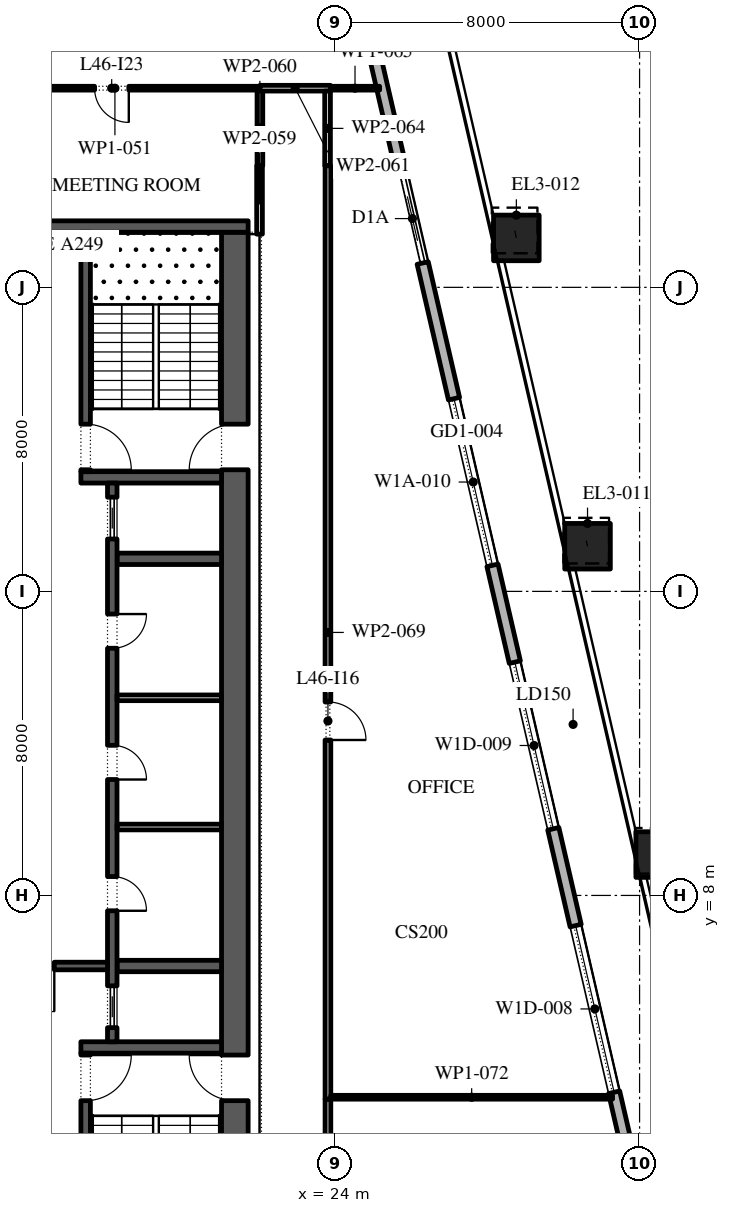
"""IFC4 building model, lengths in metres.
Left out: names, types, materials, properties, quantities, classifications, styles, units other than length and angle.
Written with IfcOpenShell. Run it as: python <this file> out.ifc"""

import sys

from ifc_helpers import new_model, si_unit, direction, frame, frame_2d, origin, origin_2d, place, context, subcontext, project, spatial, rectangle, extrude, element, fill, save


model = new_model("IFC4")
c1 = context("Model", 3, precision=1e-05, world=origin(), true_north=direction((0.0, 1.0)))
c2 = subcontext(c1, "Body", "Model", "MODEL_VIEW")
j1 = project(units=[si_unit("LENGTHUNIT", "METRE"), si_unit("PLANEANGLEUNIT", "RADIAN")], contexts=[c1])
p1 = place(None, origin())
s1 = spatial("IfcSite", under=j1, at=p1, CompositionType="ELEMENT")
p2 = place(p1, origin())
s2 = spatial("IfcBuilding", under=s1, at=p2, CompositionType="ELEMENT")
p3 = place(p2, frame((0.0, 0.0, 209.4)))
s3 = spatial("IfcBuildingStorey", under=s2, at=p3, CompositionType="ELEMENT", Elevation=209.4)
p4 = place(p3, frame((32.503, 9.075, 0.0), z_axis=(-0.00540415818, 0.023418018779, 0.999711154019), x_axis=(-0.974391195695, -0.224859506699, 0.0)))
e1 = element("IfcColumn", 1, at=p4, inside=s3, PredefinedType="COLUMN", context=c2, shape_type="SweptSolid", body=[
    extrude(rectangle(XDim=1.2, YDim=1.2, at=origin_2d()), origin(), (0.0, 0.0, 1.0), 4.201),
])
p5 = place(p3, frame((30.631, 17.188, 0.0), z_axis=(-0.008132379523, 0.035027320373, 0.999353266483), x_axis=(-0.974090845759, -0.226157078617, 0.0)))
e2 = element("IfcColumn", 2, at=p5, inside=s3, PredefinedType="COLUMN", context=c2, shape_type="SweptSolid", body=[
    extrude(rectangle(XDim=1.2, YDim=1.2, at=origin_2d()), origin(), (0.0, 0.0, 1.0), 4.203),
])
p6 = place(p3, frame((28.758, 25.3, 0.0), z_axis=(-0.01079899337, 0.046737578833, 0.998848827635), x_axis=(-0.974329962248, -0.225124686929, 0.0)))
e3 = element("IfcColumn", 3, at=p6, inside=s3, PredefinedType="COLUMN", context=c2, shape_type="SweptSolid", body=[
    extrude(rectangle(XDim=1.2, YDim=1.2, at=origin_2d()), origin(), (0.0, 0.0, 1.0), 4.205),
])
p7 = place(p3, frame((33.157, -5.092, 0.0), z_axis=(0.0, 0.0, 1.0), x_axis=(-0.224950279389, 0.974370243697, 0.0)))
e4 = element("IfcWall", 4, at=p7, inside=s3, PredefinedType="STANDARD", context=c2, shape_type="SweptSolid", body=[
    extrude(rectangle(XDim=49.5, YDim=0.3, at=frame_2d((24.75, 0.0))), origin(), (0.0, 0.0, 1.0), 4.0),
])
p8 = place(p7, frame((2.207, 0.0, 0.0)))
e5 = element("IfcOpeningElement", 5, at=p8, cuts=e4, PredefinedType="OPENING", context=c2, shape_type="SweptSolid", body=[
    extrude(rectangle(XDim=2.4, YDim=3.125, at=frame_2d((1.2, 1.562))), frame((0.0, 0.16, 0.0), z_axis=(0.0, -1.0, 0.0), x_axis=(1.0, 0.0, 0.0)), (0.0, 0.0, 1.0), 0.32),
])
p9 = place(p7, frame((8.121, 0.0, 0.45)))
e6 = element("IfcOpeningElement", 6, at=p9, cuts=e4, PredefinedType="OPENING", context=c2, shape_type="SweptSolid", body=[
    extrude(rectangle(XDim=4.5, YDim=2.875, at=frame_2d((2.25, 1.438))), frame((0.0, 0.16, 0.0), z_axis=(0.0, -1.0, 0.0), x_axis=(1.0, 0.0, 0.0)), (0.0, 0.0, 1.0), 0.32),
])
p10 = place(p7, frame((15.236, 0.0, 0.45)))
e7 = element("IfcOpeningElement", 7, at=p10, cuts=e4, PredefinedType="OPENING", context=c2, shape_type="SweptSolid", body=[
    extrude(rectangle(XDim=4.5, YDim=2.875, at=frame_2d((2.25, 1.438))), frame((0.0, 0.16, 0.0), z_axis=(0.0, -1.0, 0.0), x_axis=(1.0, 0.0, 0.0)), (0.0, 0.0, 1.0), 0.32),
])
p11 = place(p7, frame((22.35, 0.0, 0.45)))
e8 = element("IfcOpeningElement", 8, at=p11, cuts=e4, PredefinedType="OPENING", context=c2, shape_type="SweptSolid", body=[
    extrude(rectangle(XDim=4.5, YDim=3.0, at=frame_2d((2.25, 1.5))), frame((0.0, 0.16, 0.0), z_axis=(0.0, -1.0, 0.0), x_axis=(1.0, 0.0, 0.0)), (0.0, 0.0, 1.0), 0.32),
])
p12 = place(p7, frame((30.514, 0.0, 0.0)))
e9 = element("IfcOpeningElement", 9, at=p12, cuts=e4, PredefinedType="OPENING", context=c2, shape_type="SweptSolid", body=[
    extrude(rectangle(XDim=2.4, YDim=3.45, at=frame_2d((1.2, 1.725))), frame((0.0, 0.16, 0.0), z_axis=(0.0, -1.0, 0.0), x_axis=(1.0, 0.0, 0.0)), (0.0, 0.0, 1.0), 0.32),
])
p13 = place(p7, frame((36.579, 0.0, 0.45)))
e10 = element("IfcOpeningElement", 10, at=p13, cuts=e4, PredefinedType="OPENING", context=c2, shape_type="SweptSolid", body=[
    extrude(rectangle(XDim=4.5, YDim=3.05, at=frame_2d((2.25, 1.525))), frame((0.0, 0.16, 0.0), z_axis=(0.0, -1.0, 0.0), x_axis=(1.0, 0.0, 0.0)), (0.0, 0.0, 1.0), 0.32),
])
p14 = place(p7, frame((43.693, 0.0, 0.45)))
e11 = element("IfcOpeningElement", 11, at=p14, cuts=e4, PredefinedType="OPENING", context=c2, shape_type="SweptSolid", body=[
    extrude(rectangle(XDim=4.5, YDim=3.05, at=frame_2d((2.25, 1.525))), frame((0.0, 0.16, 0.0), z_axis=(0.0, -1.0, 0.0), x_axis=(1.0, 0.0, 0.0)), (0.0, 0.0, 1.0), 0.32),
])
p15 = place(p3, frame((21.35, -2.45, 0.0), z_axis=(0.0, 0.0, 1.0), x_axis=(0.0, 1.0, 0.0)))
e12 = element("IfcWall", 12, at=p15, inside=s3, PredefinedType="SHEAR", context=c2, shape_type="SweptSolid", body=[
    extrude(rectangle(XDim=27.9, YDim=0.7, at=frame_2d((13.95, 0.0))), origin(), (0.0, 0.0, 1.0), 4.0),
])
p16 = place(p15, frame((5.05, 0.0, 0.0)))
e13 = element("IfcOpeningElement", 13, at=p16, cuts=e12, PredefinedType="OPENING", context=c2, shape_type="SweptSolid", body=[
    extrude(rectangle(XDim=1.2, YDim=2.1, at=frame_2d((0.6, 1.05))), frame((0.0, 0.36, 0.0), z_axis=(0.0, -1.0, 0.0), x_axis=(1.0, 0.0, 0.0)), (0.0, 0.0, 1.0), 0.72),
])
p17 = place(p15, frame((21.65, 0.0, 0.0)))
e14 = element("IfcOpeningElement", 14, at=p17, cuts=e12, PredefinedType="OPENING", context=c2, shape_type="SweptSolid", body=[
    extrude(rectangle(XDim=1.2, YDim=2.1, at=frame_2d((0.6, 1.05))), frame((0.0, 0.36, 0.0), z_axis=(0.0, -1.0, 0.0), x_axis=(1.0, 0.0, 0.0)), (0.0, 0.0, 1.0), 0.72),
])
p18 = place(p3, frame((10.3, 25.6, 0.0), z_axis=(0.0, 0.0, 1.0), x_axis=(1.0, 0.0, 0.0)))
e15 = element("IfcWall", 15, at=p18, inside=s3, PredefinedType="SHEAR", context=c2, shape_type="SweptSolid", body=[
    extrude(rectangle(XDim=11.4, YDim=0.3, at=frame_2d((5.7, 0.0))), origin(), (0.0, 0.0, 1.0), 4.0),
])
p19 = place(p3, frame((17.3, 4.0, 0.0), z_axis=(0.0, 0.0, 1.0), x_axis=(1.0, 0.0, 0.0)))
e16 = element("IfcWall", 16, at=p19, inside=s3, PredefinedType="SHEAR", context=c2, shape_type="SweptSolid", body=[
    extrude(rectangle(XDim=3.7, YDim=0.3, at=frame_2d((1.85, 0.0))), origin(), (0.0, 0.0, 1.0), 4.0),
])
p20 = place(p3, frame((17.425, -2.45, 0.0), z_axis=(0.0, 0.0, 1.0), x_axis=(0.0, 1.0, 0.0)))
e17 = element("IfcWall", 17, at=p20, inside=s3, PredefinedType="SHEAR", context=c2, shape_type="SweptSolid", body=[
    extrude(rectangle(XDim=6.3, YDim=0.25, at=frame_2d((3.15, 0.0))), origin(), (0.0, 0.0, 1.0), 4.0),
])
p21 = place(p20, frame((5.05, 0.0, 0.0)))
e18 = element("IfcOpeningElement", 18, at=p21, cuts=e17, PredefinedType="OPENING", context=c2, shape_type="SweptSolid", body=[
    extrude(rectangle(XDim=1.2, YDim=2.1, at=frame_2d((0.6, 1.05))), frame((0.0, 0.135, 0.0), z_axis=(0.0, -1.0, 0.0), x_axis=(1.0, 0.0, 0.0)), (0.0, 0.0, 1.0), 0.27),
])
p22 = place(p3, frame((17.3, 19.0, 0.0), z_axis=(0.0, 0.0, 1.0), x_axis=(1.0, 0.0, 0.0)))
e19 = element("IfcWall", 19, at=p22, inside=s3, PredefinedType="SHEAR", context=c2, shape_type="SweptSolid", body=[
    extrude(rectangle(XDim=3.7, YDim=0.3, at=frame_2d((1.85, 0.0))), origin(), (0.0, 0.0, 1.0), 4.0),
])
p23 = place(p3, frame((17.425, 19.15, 0.0), z_axis=(0.0, 0.0, 1.0), x_axis=(0.0, 1.0, 0.0)))
e20 = element("IfcWall", 20, at=p23, inside=s3, PredefinedType="SHEAR", context=c2, shape_type="SweptSolid", body=[
    extrude(rectangle(XDim=6.3, YDim=0.25, at=frame_2d((3.15, 0.0))), origin(), (0.0, 0.0, 1.0), 4.0),
])
p24 = place(p23, frame((0.05, 0.0, 0.0)))
e21 = element("IfcOpeningElement", 21, at=p24, cuts=e20, PredefinedType="OPENING", context=c2, shape_type="SweptSolid", body=[
    extrude(rectangle(XDim=1.2, YDim=2.1, at=frame_2d((0.6, 1.05))), frame((0.0, 0.135, 0.0), z_axis=(0.0, -1.0, 0.0), x_axis=(1.0, 0.0, 0.0)), (0.0, 0.0, 1.0), 0.27),
])
for number, where, z_axis, x_axis in (
    (22, (18.25, 6.143, 0.0), (0.0, 0.0, 1.0), (1.0, 0.0, 0.0)),
    (23, (18.25, 16.857, 0.0), (0.0, 0.0, 1.0), (1.0, 0.0, 0.0)),
):
    element("IfcWall", number, at=place(p3, frame(where, z_axis=z_axis, x_axis=x_axis)), inside=s3, PredefinedType="SHEAR", context=c2, shape_type="SweptSolid", body=[
        extrude(rectangle(XDim=2.75, YDim=0.3, at=frame_2d((1.375, 0.0))), origin(), (0.0, 0.0, 1.0), 4.0),
    ])
p25 = place(p3, frame((18.125, 4.15, 0.0), z_axis=(0.0, 0.0, 1.0), x_axis=(0.0, 1.0, 0.0)))
e24 = element("IfcWall", 24, at=p25, inside=s3, PredefinedType="SHEAR", context=c2, shape_type="SweptSolid", body=[
    extrude(rectangle(XDim=14.7, YDim=0.25, at=frame_2d((7.35, 0.0))), origin(), (0.0, 0.0, 1.0), 4.0),
])
p26 = place(p25, frame((3.446, 0.0, 0.0)))
e25 = element("IfcOpeningElement", 25, at=p26, cuts=e24, PredefinedType="OPENING", context=c2, shape_type="SweptSolid", body=[
    extrude(rectangle(XDim=0.9, YDim=2.1, at=frame_2d((0.45, 1.05))), frame((0.0, 0.135, 0.0), z_axis=(0.0, -1.0, 0.0), x_axis=(1.0, 0.0, 0.0)), (0.0, 0.0, 1.0), 0.27),
])
p27 = place(p25, frame((6.9, 0.0, 0.0)))
e26 = element("IfcOpeningElement", 26, at=p27, cuts=e24, PredefinedType="OPENING", context=c2, shape_type="SweptSolid", body=[
    extrude(rectangle(XDim=0.9, YDim=2.1, at=frame_2d((0.45, 1.05))), frame((0.0, 0.135, 0.0), z_axis=(0.0, -1.0, 0.0), x_axis=(1.0, 0.0, 0.0)), (0.0, 0.0, 1.0), 0.27),
])
p28 = place(p25, frame((10.354, 0.0, 0.0)))
e27 = element("IfcOpeningElement", 27, at=p28, cuts=e24, PredefinedType="OPENING", context=c2, shape_type="SweptSolid", body=[
    extrude(rectangle(XDim=0.9, YDim=2.1, at=frame_2d((0.45, 1.05))), frame((0.0, 0.135, 0.0), z_axis=(0.0, -1.0, 0.0), x_axis=(1.0, 0.0, 0.0)), (0.0, 0.0, 1.0), 0.27),
])
p29 = place(p25, frame((0.371, 0.0, 0.0)))
e28 = element("IfcOpeningElement", 28, at=p29, cuts=e24, PredefinedType="OPENING", context=c2, shape_type="SweptSolid", body=[
    extrude(rectangle(XDim=1.1, YDim=2.1, at=frame_2d((0.55, 1.05))), frame((0.0, 0.135, 0.0), z_axis=(0.0, -1.0, 0.0), x_axis=(1.0, 0.0, 0.0)), (0.0, 0.0, 1.0), 0.27),
])
p30 = place(p25, frame((13.229, 0.0, 0.0)))
e29 = element("IfcOpeningElement", 29, at=p30, cuts=e24, PredefinedType="OPENING", context=c2, shape_type="SweptSolid", body=[
    extrude(rectangle(XDim=1.1, YDim=2.1, at=frame_2d((0.55, 1.05))), frame((0.0, 0.135, 0.0), z_axis=(0.0, -1.0, 0.0), x_axis=(1.0, 0.0, 0.0)), (0.0, 0.0, 1.0), 0.27),
])
for number, where, z_axis, x_axis in (
    (30, (18.25, 9.8, 0.0), (0.0, 0.0, 1.0), (1.0, 0.0, 0.0)),
    (31, (18.25, 13.2, 0.0), (0.0, 0.0, 1.0), (1.0, 0.0, 0.0)),
):
    element("IfcWall", number, at=place(p3, frame(where, z_axis=z_axis, x_axis=x_axis)), inside=s3, PredefinedType="PARTITIONING", context=c2, shape_type="SweptSolid", body=[
        extrude(rectangle(XDim=2.75, YDim=0.15, at=frame_2d((1.375, 0.0))), origin(), (0.0, 0.0, 1.0), 4.0),
    ])
p31 = place(p3, frame((14.0, 6.143, 0.0), z_axis=(0.0, 0.0, 1.0), x_axis=(1.0, 0.0, 0.0)))
e32 = element("IfcWall", 32, at=p31, inside=s3, PredefinedType="SHEAR", context=c2, shape_type="SweptSolid", body=[
    extrude(rectangle(XDim=4.0, YDim=0.2, at=frame_2d((2.0, 0.0))), origin(), (0.0, 0.0, 1.0), 4.0),
])
p32 = place(p31, frame((1.4, 0.0, 0.0)))
e33 = element("IfcOpeningElement", 33, at=p32, cuts=e32, PredefinedType="OPENING", context=c2, shape_type="SweptSolid", body=[
    extrude(rectangle(XDim=1.2, YDim=2.1, at=frame_2d((0.6, 1.05))), frame((0.0, 0.11, 0.0), z_axis=(0.0, -1.0, 0.0), x_axis=(1.0, 0.0, 0.0)), (0.0, 0.0, 1.0), 0.22),
])
p33 = place(p3, frame((14.38, 29.24, 0.0), z_axis=(0.0, 0.0, 1.0), x_axis=(1.0, 0.0, 0.0)))
e34 = element("IfcWall", 34, at=p33, inside=s3, PredefinedType="PARTITIONING", context=c2, shape_type="SweptSolid", body=[
    extrude(rectangle(XDim=7.63, YDim=0.1, at=frame_2d((3.815, 0.0))), origin(), (0.0, 0.0, 1.0), 4.0),
])
p34 = place(p33, frame((3.28, 0.0, 0.0)))
e35 = element("IfcOpeningElement", 35, at=p34, cuts=e34, PredefinedType="OPENING", context=c2, shape_type="SweptSolid", body=[
    extrude(rectangle(XDim=0.9, YDim=2.1, at=frame_2d((0.45, 1.05))), frame((0.0, 0.06, 0.0), z_axis=(0.0, -1.0, 0.0), x_axis=(1.0, 0.0, 0.0)), (0.0, 0.0, 1.0), 0.12),
])
p35 = place(p3, frame((22.0, 25.4, 0.0), z_axis=(0.0, 0.0, 1.0), x_axis=(0.0, 1.0, 0.0)))
e36 = element("IfcWall", 36, at=p35, inside=s3, PredefinedType="PARTITIONING", context=c2, shape_type="SweptSolid", body=[
    extrude(rectangle(XDim=1.8, YDim=0.15, at=frame_2d((0.9, 0.0))), origin(), (0.0, 0.0, 1.0), 4.0),
])
p36 = place(p3, frame((22.01, 27.2, 0.0), z_axis=(0.0, 0.0, 1.0), x_axis=(0.0, 1.0, 0.0)))
e37 = element("IfcWall", 37, at=p36, inside=s3, PredefinedType="PARTITIONING", context=c2, shape_type="SweptSolid", body=[
    extrude(rectangle(XDim=1.99, YDim=0.15, at=frame_2d((0.995, 0.0))), origin(), (0.0, 0.0, 1.0), 4.0),
])
p37 = place(p3, frame((22.01, 29.24, 0.0), z_axis=(0.0, 0.0, 1.0), x_axis=(1.0, 0.0, 0.0)))
e38 = element("IfcWall", 38, at=p37, inside=s3, PredefinedType="PARTITIONING", context=c2, shape_type="SweptSolid", body=[
    extrude(rectangle(XDim=1.855, YDim=0.15, at=frame_2d((0.927, 0.0))), origin(), (0.0, 0.0, 1.0), 4.0),
])
p38 = place(p3, frame((23.79, 29.165, 0.0), z_axis=(0.0, 0.0, 1.0), x_axis=(0.0, -1.0, 0.0)))
e39 = element("IfcWall", 39, at=p38, inside=s3, PredefinedType="PARTITIONING", context=c2, shape_type="SweptSolid", body=[
    extrude(rectangle(XDim=1.965, YDim=0.15, at=frame_2d((0.982, 0.0))), origin(), (0.0, 0.0, 1.0), 4.0),
])
p39 = place(p3, frame((23.865, 29.24, 0.0), z_axis=(0.0, 0.0, 1.0), x_axis=(1.0, 0.0, 0.0)))
e40 = element("IfcWall", 40, at=p39, inside=s3, PredefinedType="PARTITIONING", context=c2, shape_type="SweptSolid", body=[
    extrude(rectangle(XDim=1.295, YDim=0.1, at=frame_2d((0.647, 0.0))), origin(), (0.0, 0.0, 1.0), 4.0),
])
p40 = place(p3, frame((23.8, 2.64, 0.0), z_axis=(0.0, 0.0, 1.0), x_axis=(0.0, -1.0, 0.0)))
e41 = element("IfcWall", 41, at=p40, inside=s3, PredefinedType="PARTITIONING", context=c2, shape_type="SweptSolid", body=[
    extrude(rectangle(XDim=6.93, YDim=0.15, at=frame_2d((3.465, 0.0))), origin(), (0.0, 0.0, 1.0), 4.0),
])
p41 = place(p40, frame((2.98, 0.0, 0.0)))
e42 = element("IfcOpeningElement", 42, at=p41, cuts=e41, PredefinedType="OPENING", context=c2, shape_type="SweptSolid", body=[
    extrude(rectangle(XDim=1.0, YDim=2.1, at=frame_2d((0.5, 1.05))), frame((0.0, 0.085, 0.0), z_axis=(0.0, -1.0, 0.0), x_axis=(1.0, 0.0, 0.0)), (0.0, 0.0, 1.0), 0.17),
])
p42 = place(p3, frame((23.8, 27.2, 0.0), z_axis=(0.0, 0.0, 1.0), x_axis=(0.0, -1.0, 0.0)))
e43 = element("IfcWall", 43, at=p42, inside=s3, PredefinedType="PARTITIONING", context=c2, shape_type="SweptSolid", body=[
    extrude(rectangle(XDim=24.56, YDim=0.15, at=frame_2d((12.28, 0.0))), origin(), (0.0, 0.0, 1.0), 4.0),
])
p43 = place(p42, frame((14.11, 0.0, 0.0)))
e44 = element("IfcOpeningElement", 44, at=p43, cuts=e43, PredefinedType="OPENING", context=c2, shape_type="SweptSolid", body=[
    extrude(rectangle(XDim=1.0, YDim=2.1, at=frame_2d((0.5, 1.05))), frame((0.0, 0.085, 0.0), z_axis=(0.0, -1.0, 0.0), x_axis=(1.0, 0.0, 0.0)), (0.0, 0.0, 1.0), 0.17),
])
p44 = place(p3, frame((31.289, 2.69, 0.0), z_axis=(0.0, 0.0, 1.0), x_axis=(-1.0, 0.0, 0.0)))
e45 = element("IfcWall", 45, at=p44, inside=s3, PredefinedType="PARTITIONING", context=c2, shape_type="SweptSolid", body=[
    extrude(rectangle(XDim=7.414, YDim=0.1, at=frame_2d((3.707, 0.0))), origin(), (0.0, 0.0, 1.0), 4.0),
])
p45 = place(p9, origin())
e46 = element("IfcWindow", 46, at=p45, inside=s3, PartitioningType="DOUBLE_PANEL_VERTICAL", PredefinedType="WINDOW", context=c2, shape_type="SweptSolid", body=[
    extrude(rectangle(XDim=4.5, YDim=2.875, at=frame_2d((2.25, 1.438))), frame((0.0, 0.03, 0.0), z_axis=(0.0, -1.0, 0.0), x_axis=(1.0, 0.0, 0.0)), (0.0, 0.0, 1.0), 0.06),
])
fill(e6, e46)
p46 = place(p10, origin())
e47 = element("IfcWindow", 47, at=p46, inside=s3, PartitioningType="DOUBLE_PANEL_VERTICAL", PredefinedType="WINDOW", context=c2, shape_type="SweptSolid", body=[
    extrude(rectangle(XDim=4.5, YDim=2.875, at=frame_2d((2.25, 1.438))), frame((0.0, 0.03, 0.0), z_axis=(0.0, -1.0, 0.0), x_axis=(1.0, 0.0, 0.0)), (0.0, 0.0, 1.0), 0.06),
])
fill(e7, e47)
p47 = place(p11, origin())
e48 = element("IfcWindow", 48, at=p47, inside=s3, PartitioningType="DOUBLE_PANEL_VERTICAL", PredefinedType="WINDOW", context=c2, shape_type="SweptSolid", body=[
    extrude(rectangle(XDim=4.5, YDim=3.0, at=frame_2d((2.25, 1.5))), frame((0.0, 0.03, 0.0), z_axis=(0.0, -1.0, 0.0), x_axis=(1.0, 0.0, 0.0)), (0.0, 0.0, 1.0), 0.06),
])
fill(e8, e48)
p48 = place(p12, origin())
e49 = element("IfcDoor", 49, at=p48, inside=s3, OperationType="DOUBLE_DOOR_SLIDING", PredefinedType="DOOR", context=c2, shape_type="SweptSolid", body=[
    extrude(rectangle(XDim=2.4, YDim=3.45, at=frame_2d((1.2, 1.725))), frame((0.0, 0.025, 0.0), z_axis=(0.0, -1.0, 0.0), x_axis=(1.0, 0.0, 0.0)), (0.0, 0.0, 1.0), 0.05),
])
fill(e9, e49)
p49 = place(p26, frame((0.9, -0.2, 0.0), z_axis=(0.0, 0.0, 1.0), x_axis=(-1.0, 0.0, 0.0)))
e50 = element("IfcDoor", 50, at=p49, inside=s3, OperationType="SINGLE_SWING_LEFT", PredefinedType="DOOR", context=c2, shape_type="SweptSolid", body=[
    extrude(rectangle(XDim=0.9, YDim=2.1, at=frame_2d((0.45, 1.05))), frame((0.0, -0.075, 0.0), z_axis=(0.0, -1.0, 0.0), x_axis=(1.0, 0.0, 0.0)), (0.0, 0.0, 1.0), 0.05),
])
fill(e25, e50)
p50 = place(p27, frame((0.9, -0.2, 0.0), z_axis=(0.0, 0.0, 1.0), x_axis=(-1.0, 0.0, 0.0)))
e51 = element("IfcDoor", 51, at=p50, inside=s3, OperationType="SINGLE_SWING_LEFT", PredefinedType="DOOR", context=c2, shape_type="SweptSolid", body=[
    extrude(rectangle(XDim=0.9, YDim=2.1, at=frame_2d((0.45, 1.05))), frame((0.0, -0.075, 0.0), z_axis=(0.0, -1.0, 0.0), x_axis=(1.0, 0.0, 0.0)), (0.0, 0.0, 1.0), 0.05),
])
fill(e26, e51)
p51 = place(p28, frame((0.9, -0.2, 0.0), z_axis=(0.0, 0.0, 1.0), x_axis=(-1.0, 0.0, 0.0)))
e52 = element("IfcDoor", 52, at=p51, inside=s3, OperationType="SINGLE_SWING_RIGHT", PredefinedType="DOOR", context=c2, shape_type="SweptSolid", body=[
    extrude(rectangle(XDim=0.9, YDim=2.1, at=frame_2d((0.45, 1.05))), frame((0.0, -0.075, 0.0), z_axis=(0.0, -1.0, 0.0), x_axis=(1.0, 0.0, 0.0)), (0.0, 0.0, 1.0), 0.05),
])
fill(e27, e52)
p52 = place(p29, origin())
e53 = element("IfcDoor", 53, at=p52, inside=s3, OperationType="SLIDING_TO_LEFT", PredefinedType="DOOR", context=c2, shape_type="SweptSolid", body=[
    extrude(rectangle(XDim=1.1, YDim=2.1, at=frame_2d((0.55, 1.05))), frame((0.0, 0.025, 0.0), z_axis=(0.0, -1.0, 0.0), x_axis=(1.0, 0.0, 0.0)), (0.0, 0.0, 1.0), 0.05),
])
fill(e28, e53)
p53 = place(p30, origin())
e54 = element("IfcDoor", 54, at=p53, inside=s3, OperationType="SLIDING_TO_LEFT", PredefinedType="DOOR", context=c2, shape_type="SweptSolid", body=[
    extrude(rectangle(XDim=1.1, YDim=2.1, at=frame_2d((0.55, 1.05))), frame((0.0, 0.025, 0.0), z_axis=(0.0, -1.0, 0.0), x_axis=(1.0, 0.0, 0.0)), (0.0, 0.0, 1.0), 0.05),
])
fill(e29, e54)
p54 = place(p32, frame((1.2, 0.0, 0.0), z_axis=(0.0, 0.0, 1.0), x_axis=(-1.0, 0.0, 0.0)))
e55 = element("IfcDoor", 55, at=p54, inside=s3, OperationType="SINGLE_SWING_RIGHT", PredefinedType="DOOR", context=c2, shape_type="SweptSolid", body=[
    extrude(rectangle(XDim=1.2, YDim=2.1, at=frame_2d((0.6, 1.05))), frame((0.0, 0.025, 0.0), z_axis=(0.0, -1.0, 0.0), x_axis=(1.0, 0.0, 0.0)), (0.0, 0.0, 1.0), 0.05),
])
fill(e33, e55)
p55 = place(p21, frame((1.2, 0.0, 0.0), z_axis=(0.0, 0.0, 1.0), x_axis=(-1.0, 0.0, 0.0)))
e56 = element("IfcDoor", 56, at=p55, inside=s3, OperationType="SINGLE_SWING_RIGHT", PredefinedType="DOOR", context=c2, shape_type="SweptSolid", body=[
    extrude(rectangle(XDim=1.2, YDim=2.1, at=frame_2d((0.6, 1.05))), frame((0.0, 0.025, 0.0), z_axis=(0.0, -1.0, 0.0), x_axis=(1.0, 0.0, 0.0)), (0.0, 0.0, 1.0), 0.05),
])
fill(e18, e56)
p56 = place(p16, origin())
e57 = element("IfcDoor", 57, at=p56, inside=s3, OperationType="SINGLE_SWING_LEFT", PredefinedType="DOOR", context=c2, shape_type="SweptSolid", body=[
    extrude(rectangle(XDim=1.2, YDim=2.1, at=frame_2d((0.6, 1.05))), frame((0.0, 0.025, 0.0), z_axis=(0.0, -1.0, 0.0), x_axis=(1.0, 0.0, 0.0)), (0.0, 0.0, 1.0), 0.05),
])
fill(e13, e57)
p57 = place(p24, frame((1.2, 0.0, 0.0), z_axis=(0.0, 0.0, 1.0), x_axis=(-1.0, 0.0, 0.0)))
e58 = element("IfcDoor", 58, at=p57, inside=s3, OperationType="SINGLE_SWING_LEFT", PredefinedType="DOOR", context=c2, shape_type="SweptSolid", body=[
    extrude(rectangle(XDim=1.2, YDim=2.1, at=frame_2d((0.6, 1.05))), frame((0.0, 0.025, 0.0), z_axis=(0.0, -1.0, 0.0), x_axis=(1.0, 0.0, 0.0)), (0.0, 0.0, 1.0), 0.05),
])
fill(e21, e58)
p58 = place(p17, origin())
e59 = element("IfcDoor", 59, at=p58, inside=s3, OperationType="SINGLE_SWING_RIGHT", PredefinedType="DOOR", context=c2, shape_type="SweptSolid", body=[
    extrude(rectangle(XDim=1.2, YDim=2.1, at=frame_2d((0.6, 1.05))), frame((0.0, 0.025, 0.0), z_axis=(0.0, -1.0, 0.0), x_axis=(1.0, 0.0, 0.0)), (0.0, 0.0, 1.0), 0.05),
])
fill(e14, e59)
p59 = place(p43, origin())
e60 = element("IfcDoor", 60, at=p59, inside=s3, OperationType="SINGLE_SWING_LEFT", PredefinedType="DOOR", context=c2, shape_type="SweptSolid", body=[
    extrude(rectangle(XDim=1.0, YDim=2.1, at=frame_2d((0.5, 1.05))), frame((0.0, 0.025, 0.0), z_axis=(0.0, -1.0, 0.0), x_axis=(1.0, 0.0, 0.0)), (0.0, 0.0, 1.0), 0.05),
])
fill(e44, e60)
p60 = place(p34, frame((0.9, 0.0, 0.0), z_axis=(0.0, 0.0, 1.0), x_axis=(-1.0, 0.0, 0.0)))
e61 = element("IfcDoor", 61, at=p60, inside=s3, OperationType="SINGLE_SWING_RIGHT", PredefinedType="DOOR", context=c2, shape_type="SweptSolid", body=[
    extrude(rectangle(XDim=0.9, YDim=2.1, at=frame_2d((0.45, 1.05))), frame((0.0, 0.025, 0.0), z_axis=(0.0, -1.0, 0.0), x_axis=(1.0, 0.0, 0.0)), (0.0, 0.0, 1.0), 0.05),
])
fill(e35, e61)
save(model, sys.argv[1])
